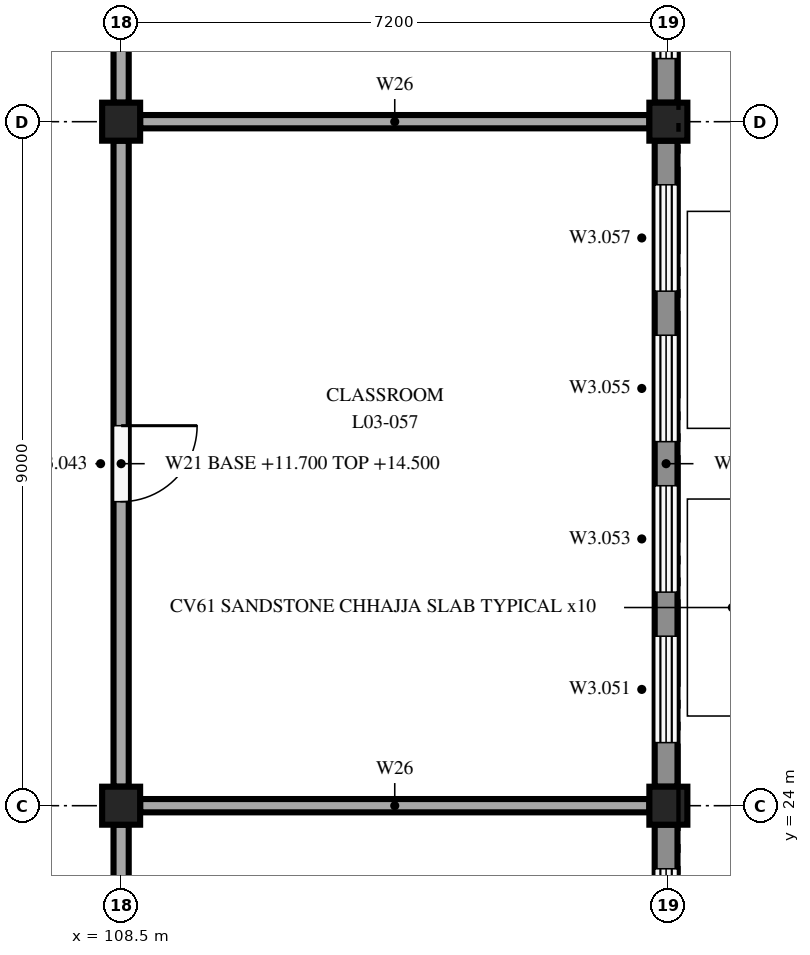
"""IFC4 building model, lengths in metres.
Left out: names, types, materials, properties, quantities, classifications, styles, units other than length and angle.
Written with IfcOpenShell. Run it as: python <this file> out.ifc"""

import sys

from ifc_helpers import new_model, si_unit, direction, frame, frame_2d, origin, origin_2d, place, context, subcontext, project, spatial, rectangle, extrude, element, fill, save


model = new_model("IFC4")
c1 = context("Model", 3, precision=1e-05, world=origin(), true_north=direction((0.0, 1.0)))
c2 = subcontext(c1, "Body", "Model", "MODEL_VIEW")
j1 = project(units=[si_unit("LENGTHUNIT", "METRE"), si_unit("PLANEANGLEUNIT", "RADIAN")], contexts=[c1])
p1 = place(None, origin())
s1 = spatial("IfcSite", under=j1, at=p1, CompositionType="ELEMENT")
p2 = place(p1, origin())
s2 = spatial("IfcBuilding", under=s1, at=p2, CompositionType="ELEMENT")
p3 = place(p2, frame((0.0, 0.0, 11.7)))
s3 = spatial("IfcBuildingStorey", under=s2, at=p3, CompositionType="ELEMENT", Elevation=11.7)
for number, where, z_axis, x_axis in (
    (1, (108.5, 24.0, 0.0), (0.0, 0.0, 1.0), (1.0, 0.0, 0.0)),
    (2, (108.5, 33.0, 0.0), (0.0, 0.0, 1.0), (1.0, 0.0, 0.0)),
    (3, (115.7, 24.0, 0.0), (0.0, 0.0, 1.0), (1.0, 0.0, 0.0)),
    (4, (115.7, 33.0, 0.0), (0.0, 0.0, 1.0), (1.0, 0.0, 0.0)),
):
    element("IfcColumn", number, at=place(p3, frame(where, z_axis=z_axis, x_axis=x_axis)), inside=s3, PredefinedType="COLUMN", context=c2, shape_type="SweptSolid", body=[
        extrude(rectangle(XDim=0.5, YDim=0.5, at=origin_2d()), origin(), (0.0, 0.0, 1.0), 3.3),
    ])
p4 = place(p3, frame((115.67, 23.75, 0.0), z_axis=(0.0, 0.0, 1.0), x_axis=(0.0, -1.0, 0.0)))
e5 = element("IfcWall", 5, at=p4, inside=s3, PredefinedType="STANDARD", context=c2, shape_type="SweptSolid", body=[
    extrude(rectangle(XDim=8.5, YDim=0.3, at=frame_2d((4.25, 0.0))), origin(), (0.0, 0.0, 1.0), 2.75),
])
p5 = place(p4, frame((6.52, 0.0, 0.6)))
e6 = element("IfcOpeningElement", 6, at=p5, cuts=e5, PredefinedType="OPENING", context=c2, shape_type="SweptSolid", body=[
    extrude(rectangle(XDim=1.4, YDim=2.1, at=frame_2d((0.7, 1.05))), frame((0.0, 0.16, 0.0), z_axis=(0.0, -1.0, 0.0), x_axis=(1.0, 0.0, 0.0)), (0.0, 0.0, 1.0), 0.32),
])
p6 = place(p4, frame((4.54, 0.0, 0.6)))
e7 = element("IfcOpeningElement", 7, at=p6, cuts=e5, PredefinedType="OPENING", context=c2, shape_type="SweptSolid", body=[
    extrude(rectangle(XDim=1.4, YDim=2.1, at=frame_2d((0.7, 1.05))), frame((0.0, 0.16, 0.0), z_axis=(0.0, -1.0, 0.0), x_axis=(1.0, 0.0, 0.0)), (0.0, 0.0, 1.0), 0.32),
])
p7 = place(p4, frame((2.56, 0.0, 0.6)))
e8 = element("IfcOpeningElement", 8, at=p7, cuts=e5, PredefinedType="OPENING", context=c2, shape_type="SweptSolid", body=[
    extrude(rectangle(XDim=1.4, YDim=2.1, at=frame_2d((0.7, 1.05))), frame((0.0, 0.16, 0.0), z_axis=(0.0, -1.0, 0.0), x_axis=(1.0, 0.0, 0.0)), (0.0, 0.0, 1.0), 0.32),
])
p8 = place(p4, frame((0.58, 0.0, 0.6)))
e9 = element("IfcOpeningElement", 9, at=p8, cuts=e5, PredefinedType="OPENING", context=c2, shape_type="SweptSolid", body=[
    extrude(rectangle(XDim=1.4, YDim=2.1, at=frame_2d((0.7, 1.05))), frame((0.0, 0.16, 0.0), z_axis=(0.0, -1.0, 0.0), x_axis=(1.0, 0.0, 0.0)), (0.0, 0.0, 1.0), 0.32),
])
p9 = place(p3, frame((115.67, 32.75, 0.0), z_axis=(0.0, 0.0, 1.0), x_axis=(0.0, -1.0, 0.0)))
e10 = element("IfcWall", 10, at=p9, inside=s3, PredefinedType="STANDARD", context=c2, shape_type="SweptSolid", body=[
    extrude(rectangle(XDim=8.5, YDim=0.3, at=frame_2d((4.25, 0.0))), origin(), (0.0, 0.0, 1.0), 2.75),
])
p10 = place(p9, frame((6.52, 0.0, 0.6)))
e11 = element("IfcOpeningElement", 11, at=p10, cuts=e10, PredefinedType="OPENING", context=c2, shape_type="SweptSolid", body=[
    extrude(rectangle(XDim=1.4, YDim=2.1, at=frame_2d((0.7, 1.05))), frame((0.0, 0.16, 0.0), z_axis=(0.0, -1.0, 0.0), x_axis=(1.0, 0.0, 0.0)), (0.0, 0.0, 1.0), 0.32),
])
p11 = place(p9, frame((4.54, 0.0, 0.6)))
e12 = element("IfcOpeningElement", 12, at=p11, cuts=e10, PredefinedType="OPENING", context=c2, shape_type="SweptSolid", body=[
    extrude(rectangle(XDim=1.4, YDim=2.1, at=frame_2d((0.7, 1.05))), frame((0.0, 0.16, 0.0), z_axis=(0.0, -1.0, 0.0), x_axis=(1.0, 0.0, 0.0)), (0.0, 0.0, 1.0), 0.32),
])
p12 = place(p9, frame((2.56, 0.0, 0.6)))
e13 = element("IfcOpeningElement", 13, at=p12, cuts=e10, PredefinedType="OPENING", context=c2, shape_type="SweptSolid", body=[
    extrude(rectangle(XDim=1.4, YDim=2.1, at=frame_2d((0.7, 1.05))), frame((0.0, 0.16, 0.0), z_axis=(0.0, -1.0, 0.0), x_axis=(1.0, 0.0, 0.0)), (0.0, 0.0, 1.0), 0.32),
])
p13 = place(p9, frame((0.58, 0.0, 0.6)))
e14 = element("IfcOpeningElement", 14, at=p13, cuts=e10, PredefinedType="OPENING", context=c2, shape_type="SweptSolid", body=[
    extrude(rectangle(XDim=1.4, YDim=2.1, at=frame_2d((0.7, 1.05))), frame((0.0, 0.16, 0.0), z_axis=(0.0, -1.0, 0.0), x_axis=(1.0, 0.0, 0.0)), (0.0, 0.0, 1.0), 0.32),
])
p14 = place(p3, frame((115.67, 41.75, 0.0), z_axis=(0.0, 0.0, 1.0), x_axis=(0.0, -1.0, 0.0)))
e15 = element("IfcWall", 15, at=p14, inside=s3, PredefinedType="STANDARD", context=c2, shape_type="SweptSolid", body=[
    extrude(rectangle(XDim=8.5, YDim=0.3, at=frame_2d((4.25, 0.0))), origin(), (0.0, 0.0, 1.0), 2.75),
])
p15 = place(p14, frame((6.52, 0.0, 0.3)))
e16 = element("IfcOpeningElement", 16, at=p15, cuts=e15, PredefinedType="OPENING", context=c2, shape_type="SweptSolid", body=[
    extrude(rectangle(XDim=1.4, YDim=2.4, at=frame_2d((0.7, 1.2))), frame((0.0, 0.16, 0.0), z_axis=(0.0, -1.0, 0.0), x_axis=(1.0, 0.0, 0.0)), (0.0, 0.0, 1.0), 0.32),
])
p16 = place(p14, frame((4.54, 0.0, 0.3)))
e17 = element("IfcOpeningElement", 17, at=p16, cuts=e15, PredefinedType="OPENING", context=c2, shape_type="SweptSolid", body=[
    extrude(rectangle(XDim=1.4, YDim=2.4, at=frame_2d((0.7, 1.2))), frame((0.0, 0.16, 0.0), z_axis=(0.0, -1.0, 0.0), x_axis=(1.0, 0.0, 0.0)), (0.0, 0.0, 1.0), 0.32),
])
p17 = place(p14, frame((2.56, 0.0, 0.3)))
e18 = element("IfcOpeningElement", 18, at=p17, cuts=e15, PredefinedType="OPENING", context=c2, shape_type="SweptSolid", body=[
    extrude(rectangle(XDim=1.4, YDim=2.4, at=frame_2d((0.7, 1.2))), frame((0.0, 0.16, 0.0), z_axis=(0.0, -1.0, 0.0), x_axis=(1.0, 0.0, 0.0)), (0.0, 0.0, 1.0), 0.32),
])
p18 = place(p14, frame((0.58, 0.0, 0.3)))
e19 = element("IfcOpeningElement", 19, at=p18, cuts=e15, PredefinedType="OPENING", context=c2, shape_type="SweptSolid", body=[
    extrude(rectangle(XDim=1.4, YDim=2.4, at=frame_2d((0.7, 1.2))), frame((0.0, 0.16, 0.0), z_axis=(0.0, -1.0, 0.0), x_axis=(1.0, 0.0, 0.0)), (0.0, 0.0, 1.0), 0.32),
])
p19 = place(p3, frame((108.5, 23.75, 0.0), z_axis=(0.0, 0.0, 1.0), x_axis=(0.0, -1.0, 0.0)))
e20 = element("IfcWall", 20, at=p19, inside=s3, PredefinedType="PARTITIONING", context=c2, shape_type="SweptSolid", body=[
    extrude(rectangle(XDim=8.5, YDim=0.2, at=frame_2d((4.25, 0.0))), origin(), (0.0, 0.0, 1.0), 2.8),
])
p20 = place(p19, frame((5.919, 0.0, 0.0)))
e21 = element("IfcOpeningElement", 21, at=p20, cuts=e20, PredefinedType="OPENING", context=c2, shape_type="SweptSolid", body=[
    extrude(rectangle(XDim=1.0, YDim=2.1, at=frame_2d((0.5, 1.05))), frame((0.0, 0.11, 0.0), z_axis=(0.0, -1.0, 0.0), x_axis=(1.0, 0.0, 0.0)), (0.0, 0.0, 1.0), 0.22),
])
p21 = place(p19, frame((1.581, 0.0, 0.0)))
e22 = element("IfcOpeningElement", 22, at=p21, cuts=e20, PredefinedType="OPENING", context=c2, shape_type="SweptSolid", body=[
    extrude(rectangle(XDim=1.0, YDim=2.1, at=frame_2d((0.5, 1.05))), frame((0.0, 0.11, 0.0), z_axis=(0.0, -1.0, 0.0), x_axis=(1.0, 0.0, 0.0)), (0.0, 0.0, 1.0), 0.22),
])
p22 = place(p3, frame((108.5, 32.75, 0.0), z_axis=(0.0, 0.0, 1.0), x_axis=(0.0, -1.0, 0.0)))
e23 = element("IfcWall", 23, at=p22, inside=s3, PredefinedType="PARTITIONING", context=c2, shape_type="SweptSolid", body=[
    extrude(rectangle(XDim=8.5, YDim=0.2, at=frame_2d((4.25, 0.0))), origin(), (0.0, 0.0, 1.0), 2.8),
])
p23 = place(p22, frame((3.75, 0.0, 0.0)))
e24 = element("IfcOpeningElement", 24, at=p23, cuts=e23, PredefinedType="OPENING", context=c2, shape_type="SweptSolid", body=[
    extrude(rectangle(XDim=1.0, YDim=2.1, at=frame_2d((0.5, 1.05))), frame((0.0, 0.11, 0.0), z_axis=(0.0, -1.0, 0.0), x_axis=(1.0, 0.0, 0.0)), (0.0, 0.0, 1.0), 0.22),
])
p24 = place(p3, frame((108.5, 41.75, 0.0), z_axis=(0.0, 0.0, 1.0), x_axis=(0.0, -1.0, 0.0)))
e25 = element("IfcWall", 25, at=p24, inside=s3, PredefinedType="PARTITIONING", context=c2, shape_type="SweptSolid", body=[
    extrude(rectangle(XDim=8.5, YDim=0.2, at=frame_2d((4.25, 0.0))), origin(), (0.0, 0.0, 1.0), 2.8),
])
p25 = place(p24, frame((3.5, 0.0, 0.0)))
e26 = element("IfcOpeningElement", 26, at=p25, cuts=e25, PredefinedType="OPENING", context=c2, shape_type="SweptSolid", body=[
    extrude(rectangle(XDim=1.5, YDim=2.1, at=frame_2d((0.75, 1.05))), frame((0.0, 0.11, 0.0), z_axis=(0.0, -1.0, 0.0), x_axis=(1.0, 0.0, 0.0)), (0.0, 0.0, 1.0), 0.22),
])
for number, where, z_axis, x_axis in (
    (27, (108.75, 24.0, 0.0), (0.0, 0.0, 1.0), (1.0, 0.0, 0.0)),
    (28, (108.75, 33.0, 0.0), (0.0, 0.0, 1.0), (1.0, 0.0, 0.0)),
):
    element("IfcWall", number, at=place(p3, frame(where, z_axis=z_axis, x_axis=x_axis)), inside=s3, PredefinedType="PARTITIONING", context=c2, shape_type="SweptSolid", body=[
        extrude(rectangle(XDim=6.7, YDim=0.175, at=frame_2d((3.35, 0.0))), origin(), (0.0, 0.0, 1.0), 2.8),
    ])
p26 = place(p8, origin())
e29 = element("IfcWindow", 29, at=p26, inside=s3, PartitioningType="DOUBLE_PANEL_VERTICAL", PredefinedType="WINDOW", context=c2, shape_type="SweptSolid", body=[
    extrude(rectangle(XDim=1.4, YDim=2.1, at=frame_2d((0.7, 1.05))), frame((0.0, 0.03, 0.0), z_axis=(0.0, -1.0, 0.0), x_axis=(1.0, 0.0, 0.0)), (0.0, 0.0, 1.0), 0.06),
])
fill(e9, e29)
p27 = place(p10, origin())
e30 = element("IfcWindow", 30, at=p27, inside=s3, PartitioningType="DOUBLE_PANEL_VERTICAL", PredefinedType="WINDOW", context=c2, shape_type="SweptSolid", body=[
    extrude(rectangle(XDim=1.4, YDim=2.1, at=frame_2d((0.7, 1.05))), frame((0.0, 0.03, 0.0), z_axis=(0.0, -1.0, 0.0), x_axis=(1.0, 0.0, 0.0)), (0.0, 0.0, 1.0), 0.06),
])
fill(e11, e30)
p28 = place(p11, origin())
e31 = element("IfcWindow", 31, at=p28, inside=s3, PartitioningType="DOUBLE_PANEL_VERTICAL", PredefinedType="WINDOW", context=c2, shape_type="SweptSolid", body=[
    extrude(rectangle(XDim=1.4, YDim=2.1, at=frame_2d((0.7, 1.05))), frame((0.0, 0.03, 0.0), z_axis=(0.0, -1.0, 0.0), x_axis=(1.0, 0.0, 0.0)), (0.0, 0.0, 1.0), 0.06),
])
fill(e12, e31)
p29 = place(p12, origin())
e32 = element("IfcWindow", 32, at=p29, inside=s3, PartitioningType="DOUBLE_PANEL_VERTICAL", PredefinedType="WINDOW", context=c2, shape_type="SweptSolid", body=[
    extrude(rectangle(XDim=1.4, YDim=2.1, at=frame_2d((0.7, 1.05))), frame((0.0, 0.03, 0.0), z_axis=(0.0, -1.0, 0.0), x_axis=(1.0, 0.0, 0.0)), (0.0, 0.0, 1.0), 0.06),
])
fill(e13, e32)
p30 = place(p13, origin())
e33 = element("IfcWindow", 33, at=p30, inside=s3, PartitioningType="DOUBLE_PANEL_VERTICAL", PredefinedType="WINDOW", context=c2, shape_type="SweptSolid", body=[
    extrude(rectangle(XDim=1.4, YDim=2.1, at=frame_2d((0.7, 1.05))), frame((0.0, 0.03, 0.0), z_axis=(0.0, -1.0, 0.0), x_axis=(1.0, 0.0, 0.0)), (0.0, 0.0, 1.0), 0.06),
])
fill(e14, e33)
p31 = place(p15, origin())
e34 = element("IfcWindow", 34, at=p31, inside=s3, PartitioningType="DOUBLE_PANEL_VERTICAL", PredefinedType="WINDOW", context=c2, shape_type="SweptSolid", body=[
    extrude(rectangle(XDim=1.4, YDim=2.4, at=frame_2d((0.7, 1.2))), frame((0.0, 0.03, 0.0), z_axis=(0.0, -1.0, 0.0), x_axis=(1.0, 0.0, 0.0)), (0.0, 0.0, 1.0), 0.06),
])
fill(e16, e34)
p32 = place(p23, origin())
e35 = element("IfcDoor", 35, at=p32, inside=s3, OperationType="SINGLE_SWING_LEFT", PredefinedType="DOOR", context=c2, shape_type="SweptSolid", body=[
    extrude(rectangle(XDim=1.0, YDim=2.1, at=frame_2d((0.5, 1.05))), frame((0.0, 0.025, 0.0), z_axis=(0.0, -1.0, 0.0), x_axis=(1.0, 0.0, 0.0)), (0.0, 0.0, 1.0), 0.05),
])
fill(e24, e35)
save(model, sys.argv[1])
